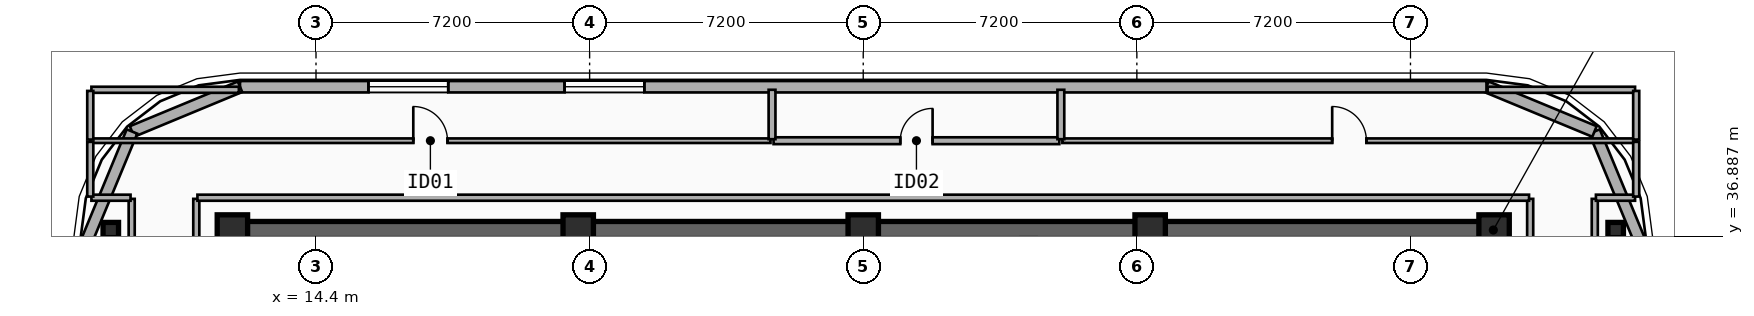
"""IFC4 building model, lengths in metres.
Left out: names, types, materials, properties, quantities, classifications, styles, units other than length and angle.
Written with IfcOpenShell. Run it as: python <this file> out.ifc"""

import sys

from ifc_helpers import new_model, si_unit, direction, frame, frame_2d, origin, origin_2d, place, context, subcontext, project, spatial, rectangle, i_section, extrude, element, fill, save


model = new_model("IFC4")
c1 = context("Model", 3, precision=1e-05, world=origin(), true_north=direction((0.0, 1.0)))
c2 = subcontext(c1, "Body", "Model", "MODEL_VIEW")
j1 = project(units=[si_unit("LENGTHUNIT", "METRE"), si_unit("PLANEANGLEUNIT", "RADIAN")], contexts=[c1])
p1 = place(None, origin())
s1 = spatial("IfcSite", under=j1, at=p1, CompositionType="ELEMENT")
p2 = place(p1, origin())
s2 = spatial("IfcBuilding", under=s1, at=p2, CompositionType="ELEMENT")
p3 = place(p2, frame((0.0, 0.0, 243.6)))
s3 = spatial("IfcBuildingStorey", under=s2, at=p3, CompositionType="ELEMENT", Elevation=243.6)
p4 = place(p3, frame((12.15, 37.05, 0.0), z_axis=(0.0, 0.0, 1.0), x_axis=(1.0, 0.0, 0.0)))
e1 = element("IfcWall", 1, at=p4, inside=s3, PredefinedType="SHEAR", context=c2, shape_type="SweptSolid", body=[
    extrude(rectangle(XDim=33.23, YDim=0.45, at=frame_2d((16.615, 0.0))), origin(), (0.0, 0.0, 1.0), 3.7),
])
for number, where, z_axis, x_axis in (
    (2, (12.2, 37.05, 0.0), (0.0, 0.0, 1.0), (1.0, 0.0, 0.0)),
    (3, (21.3, 37.05, 0.0), (0.0, 0.0, 1.0), (1.0, 0.0, 0.0)),
    (4, (28.8, 37.05, 0.0), (0.0, 0.0, 1.0), (1.0, 0.0, 0.0)),
    (5, (36.35, 37.05, 0.0), (0.0, 0.0, 1.0), (1.0, 0.0, 0.0)),
    (6, (45.4, 37.05, 0.0), (0.0, 0.0, 1.0), (1.0, 0.0, 0.0)),
):
    element("IfcColumn", number, at=place(p3, frame(where, z_axis=z_axis, x_axis=x_axis)), inside=s3, PredefinedType="COLUMN", context=c2, shape_type="SweptSolid", body=[
        extrude(rectangle(XDim=0.8, YDim=0.8, at=origin_2d()), origin(), (0.0, 0.0, 1.0), 3.7),
    ])
for number, where, z_axis, x_axis in (
    (7, (9.0, 37.05, 0.0), (0.0, 0.0, 1.0), (1.0, 0.0, 0.0)),
    (8, (48.6, 37.05, 0.0), (0.0, 0.0, 1.0), (1.0, 0.0, 0.0)),
):
    element("IfcColumn", number, at=place(p3, frame(where, z_axis=z_axis, x_axis=x_axis)), inside=s3, PredefinedType="COLUMN", context=c2, shape_type="SweptSolid", body=[
        extrude(i_section(OverallWidth=0.408, OverallDepth=0.4, WebThickness=0.025, FlangeThickness=0.039, FilletRadius=0.015, at=origin_2d()), origin(), (0.0, 0.0, 1.0), 3.7),
    ])
for number, where, z_axis, x_axis in (
    (9, (48.042, 39.643, 0.0), (0.0, 0.0, 1.0), (0.383, -0.924, 0.0)),
    (10, (45.2, 40.82, 0.0), (0.0, 0.0, 1.0), (0.924, -0.383, 0.0)),
):
    element("IfcWall", number, at=place(p3, frame(where, z_axis=z_axis, x_axis=x_axis)), inside=s3, PredefinedType="SOLIDWALL", context=c2, shape_type="SweptSolid", body=[
        extrude(rectangle(XDim=3.077, YDim=0.3, at=frame_2d((1.538, 0.0))), origin(), (0.0, 0.0, 1.0), 3.42),
    ])
p5 = place(p3, frame((12.4, 40.82, 0.0), z_axis=(0.0, 0.0, 1.0), x_axis=(1.0, 0.0, 0.0)))
e11 = element("IfcWall", 11, at=p5, inside=s3, PredefinedType="SOLIDWALL", context=c2, shape_type="SweptSolid", body=[
    extrude(rectangle(XDim=32.8, YDim=0.3, at=frame_2d((16.4, 0.0))), origin(), (0.0, 0.0, 1.0), 3.42),
])
p6 = place(p5, frame((3.38, 0.0, 0.75)))
e12 = element("IfcOpeningElement", 12, at=p6, cuts=e11, PredefinedType="OPENING", context=c2, shape_type="SweptSolid", body=[
    extrude(rectangle(XDim=2.1, YDim=2.1, at=frame_2d((1.05, 1.05))), frame((0.0, 0.16, 0.0), z_axis=(0.0, -1.0, 0.0), x_axis=(1.0, 0.0, 0.0)), (0.0, 0.0, 1.0), 0.32),
])
p7 = place(p5, frame((8.54, 0.0, 0.75)))
e13 = element("IfcOpeningElement", 13, at=p7, cuts=e11, PredefinedType="OPENING", context=c2, shape_type="SweptSolid", body=[
    extrude(rectangle(XDim=2.1, YDim=2.1, at=frame_2d((1.05, 1.05))), frame((0.0, 0.16, 0.0), z_axis=(0.0, -1.0, 0.0), x_axis=(1.0, 0.0, 0.0)), (0.0, 0.0, 1.0), 0.32),
])
for number, where, z_axis, x_axis in (
    (14, (9.557, 39.643, 0.0), (0.0, 0.0, 1.0), (0.924, 0.383, 0.0)),
    (15, (8.38, 36.8, 0.0), (0.0, 0.0, 1.0), (0.383, 0.924, 0.0)),
):
    element("IfcWall", number, at=place(p3, frame(where, z_axis=z_axis, x_axis=x_axis)), inside=s3, PredefinedType="SOLIDWALL", context=c2, shape_type="SweptSolid", body=[
        extrude(rectangle(XDim=3.077, YDim=0.3, at=frame_2d((1.538, 0.0))), origin(), (0.0, 0.0, 1.0), 3.42),
    ])
p8 = place(p3, frame((8.46, 39.4, 0.0), z_axis=(0.0, 0.0, 1.0), x_axis=(1.0, 0.0, 0.0)))
e16 = element("IfcWall", 16, at=p8, inside=s3, PredefinedType="PARTITIONING", context=c2, shape_type="SweptSolid", body=[
    extrude(rectangle(XDim=17.9, YDim=0.12, at=frame_2d((8.95, 0.0))), origin(), (0.0, 0.0, 1.0), 3.42),
])
p9 = place(p8, frame((8.5, 0.0, 0.0)))
e17 = element("IfcOpeningElement", 17, at=p9, cuts=e16, PredefinedType="OPENING", context=c2, shape_type="SweptSolid", body=[
    extrude(rectangle(XDim=0.9, YDim=2.1, at=frame_2d((0.45, 1.05))), frame((0.0, 0.07, 0.0), z_axis=(0.0, -1.0, 0.0), x_axis=(1.0, 0.0, 0.0)), (0.0, 0.0, 1.0), 0.14),
])
p10 = place(p3, frame((26.44, 39.4, 0.0), z_axis=(0.0, 0.0, 1.0), x_axis=(1.0, 0.0, 0.0)))
e18 = element("IfcWall", 18, at=p10, inside=s3, PredefinedType="PLUMBINGWALL", context=c2, shape_type="SweptSolid", body=[
    extrude(rectangle(XDim=7.52, YDim=0.18, at=frame_2d((3.76, 0.0))), origin(), (0.0, 0.0, 1.0), 3.42),
])
p11 = place(p10, frame((3.335, 0.0, 0.0)))
e19 = element("IfcOpeningElement", 19, at=p11, cuts=e18, PredefinedType="OPENING", context=c2, shape_type="SweptSolid", body=[
    extrude(rectangle(XDim=0.85, YDim=2.1, at=frame_2d((0.425, 1.05))), frame((0.0, 0.1, 0.0), z_axis=(0.0, -1.0, 0.0), x_axis=(1.0, 0.0, 0.0)), (0.0, 0.0, 1.0), 0.2),
])
p12 = place(p3, frame((34.04, 39.4, 0.0), z_axis=(0.0, 0.0, 1.0), x_axis=(1.0, 0.0, 0.0)))
e20 = element("IfcWall", 20, at=p12, inside=s3, PredefinedType="PARTITIONING", context=c2, shape_type="SweptSolid", body=[
    extrude(rectangle(XDim=15.1, YDim=0.12, at=frame_2d((7.55, 0.0))), origin(), (0.0, 0.0, 1.0), 3.42),
])
p13 = place(p12, frame((7.1, 0.0, 0.0)))
e21 = element("IfcOpeningElement", 21, at=p13, cuts=e20, PredefinedType="OPENING", context=c2, shape_type="SweptSolid", body=[
    extrude(rectangle(XDim=0.9, YDim=2.1, at=frame_2d((0.45, 1.05))), frame((0.0, 0.07, 0.0), z_axis=(0.0, -1.0, 0.0), x_axis=(1.0, 0.0, 0.0)), (0.0, 0.0, 1.0), 0.14),
])
for number, where, z_axis, x_axis in (
    (22, (26.4, 39.44, 0.0), (0.0, 0.0, 1.0), (0.0, 1.0, 0.0)),
    (23, (34.0, 39.44, 0.0), (0.0, 0.0, 1.0), (0.0, 1.0, 0.0)),
):
    element("IfcWall", number, at=place(p3, frame(where, z_axis=z_axis, x_axis=x_axis)), inside=s3, PredefinedType="PLUMBINGWALL", context=c2, shape_type="SweptSolid", body=[
        extrude(rectangle(XDim=1.3, YDim=0.18, at=frame_2d((0.65, 0.0))), origin(), (0.0, 0.0, 1.0), 3.42),
    ])
for number, where, z_axis, x_axis in (
    (24, (9.55, 27.63, 0.0), (0.0, 0.0, 1.0), (0.0, 1.0, 0.0)),
    (25, (11.25, 27.63, 0.0), (0.0, 0.0, 1.0), (0.0, 1.0, 0.0)),
    (26, (46.35, 27.63, 0.0), (0.0, 0.0, 1.0), (0.0, 1.0, 0.0)),
    (27, (48.05, 27.63, 0.0), (0.0, 0.0, 1.0), (0.0, 1.0, 0.0)),
):
    element("IfcWall", number, at=place(p3, frame(where, z_axis=z_axis, x_axis=x_axis)), inside=s3, PredefinedType="PARTITIONING", context=c2, shape_type="SweptSolid", body=[
        extrude(rectangle(XDim=10.24, YDim=0.16, at=frame_2d((5.12, 0.0))), origin(), (0.0, 0.0, 1.0), 2.9),
    ])
p14 = place(p3, frame((8.49, 37.9, 0.0), z_axis=(0.0, 0.0, 1.0), x_axis=(1.0, 0.0, 0.0)))
e28 = element("IfcWall", 28, at=p14, inside=s3, PredefinedType="PARTITIONING", context=c2, shape_type="SweptSolid", body=[
    extrude(rectangle(XDim=1.03, YDim=0.16, at=frame_2d((0.515, 0.0))), origin(), (0.0, 0.0, 1.0), 3.42),
])
p15 = place(p3, frame((11.28, 37.9, 0.0), z_axis=(0.0, 0.0, 1.0), x_axis=(1.0, 0.0, 0.0)))
e29 = element("IfcWall", 29, at=p15, inside=s3, PredefinedType="PARTITIONING", context=c2, shape_type="SweptSolid", body=[
    extrude(rectangle(XDim=35.04, YDim=0.16, at=frame_2d((17.52, 0.0))), origin(), (0.0, 0.0, 1.0), 3.42),
])
p16 = place(p3, frame((48.08, 37.9, 0.0), z_axis=(0.0, 0.0, 1.0), x_axis=(1.0, 0.0, 0.0)))
e30 = element("IfcWall", 30, at=p16, inside=s3, PredefinedType="PARTITIONING", context=c2, shape_type="SweptSolid", body=[
    extrude(rectangle(XDim=1.03, YDim=0.16, at=frame_2d((0.515, 0.0))), origin(), (0.0, 0.0, 1.0), 3.42),
])
for number, where, z_axis, x_axis in (
    (31, (8.46, 37.93, 0.0), (0.0, 0.0, 1.0), (0.0, 1.0, 0.0)),
    (32, (49.14, 37.93, 0.0), (0.0, 0.0, 1.0), (0.0, 1.0, 0.0)),
):
    element("IfcWall", number, at=place(p3, frame(where, z_axis=z_axis, x_axis=x_axis)), inside=s3, PredefinedType="PARTITIONING", context=c2, shape_type="SweptSolid", body=[
        extrude(rectangle(XDim=1.44, YDim=0.16, at=frame_2d((0.72, 0.0))), origin(), (0.0, 0.0, 1.0), 3.42),
    ])
p17 = place(p3, frame((8.49, 40.74, 0.0), z_axis=(0.0, 0.0, 1.0), x_axis=(1.0, 0.0, 0.0)))
e33 = element("IfcWall", 33, at=p17, inside=s3, PredefinedType="PARTITIONING", context=c2, shape_type="SweptSolid", body=[
    extrude(rectangle(XDim=3.88, YDim=0.16, at=frame_2d((1.94, 0.0))), origin(), (0.0, 0.0, 1.0), 3.42),
])
p18 = place(p3, frame((8.46, 39.43, 0.0), z_axis=(0.0, 0.0, 1.0), x_axis=(0.0, 1.0, 0.0)))
e34 = element("IfcWall", 34, at=p18, inside=s3, PredefinedType="PARTITIONING", context=c2, shape_type="SweptSolid", body=[
    extrude(rectangle(XDim=1.28, YDim=0.16, at=frame_2d((0.64, 0.0))), origin(), (0.0, 0.0, 1.0), 3.42),
])
p19 = place(p3, frame((45.23, 40.74, 0.0), z_axis=(0.0, 0.0, 1.0), x_axis=(1.0, 0.0, 0.0)))
e35 = element("IfcWall", 35, at=p19, inside=s3, PredefinedType="PARTITIONING", context=c2, shape_type="SweptSolid", body=[
    extrude(rectangle(XDim=3.88, YDim=0.16, at=frame_2d((1.94, 0.0))), origin(), (0.0, 0.0, 1.0), 3.42),
])
p20 = place(p3, frame((49.14, 39.43, 0.0), z_axis=(0.0, 0.0, 1.0), x_axis=(0.0, 1.0, 0.0)))
e36 = element("IfcWall", 36, at=p20, inside=s3, PredefinedType="PARTITIONING", context=c2, shape_type="SweptSolid", body=[
    extrude(rectangle(XDim=1.28, YDim=0.16, at=frame_2d((0.64, 0.0))), origin(), (0.0, 0.0, 1.0), 3.42),
])
p21 = place(p6, origin())
e37 = element("IfcWindow", 37, at=p21, inside=s3, PartitioningType="SINGLE_PANEL", PredefinedType="WINDOW", context=c2, shape_type="SweptSolid", body=[
    extrude(rectangle(XDim=2.1, YDim=2.1, at=frame_2d((1.05, 1.05))), frame((0.0, 0.03, 0.0), z_axis=(0.0, -1.0, 0.0), x_axis=(1.0, 0.0, 0.0)), (0.0, 0.0, 1.0), 0.06),
])
fill(e12, e37)
p22 = place(p7, origin())
e38 = element("IfcWindow", 38, at=p22, inside=s3, PartitioningType="SINGLE_PANEL", PredefinedType="WINDOW", context=c2, shape_type="SweptSolid", body=[
    extrude(rectangle(XDim=2.1, YDim=2.1, at=frame_2d((1.05, 1.05))), frame((0.0, 0.03, 0.0), z_axis=(0.0, -1.0, 0.0), x_axis=(1.0, 0.0, 0.0)), (0.0, 0.0, 1.0), 0.06),
])
fill(e13, e38)
p23 = place(p9, origin())
e39 = element("IfcDoor", 39, at=p23, inside=s3, OperationType="SINGLE_SWING_LEFT", PredefinedType="DOOR", context=c2, shape_type="SweptSolid", body=[
    extrude(rectangle(XDim=0.9, YDim=2.1, at=frame_2d((0.45, 1.05))), frame((0.0, 0.025, 0.0), z_axis=(0.0, -1.0, 0.0), x_axis=(1.0, 0.0, 0.0)), (0.0, 0.0, 1.0), 0.05),
])
fill(e17, e39)
p24 = place(p11, origin())
e40 = element("IfcDoor", 40, at=p24, inside=s3, OperationType="SINGLE_SWING_RIGHT", PredefinedType="DOOR", context=c2, shape_type="SweptSolid", body=[
    extrude(rectangle(XDim=0.85, YDim=2.1, at=frame_2d((0.425, 1.05))), frame((0.0, 0.025, 0.0), z_axis=(0.0, -1.0, 0.0), x_axis=(1.0, 0.0, 0.0)), (0.0, 0.0, 1.0), 0.05),
])
fill(e19, e40)
p25 = place(p13, origin())
e41 = element("IfcDoor", 41, at=p25, inside=s3, OperationType="SINGLE_SWING_LEFT", PredefinedType="DOOR", context=c2, shape_type="SweptSolid", body=[
    extrude(rectangle(XDim=0.9, YDim=2.1, at=frame_2d((0.45, 1.05))), frame((0.0, 0.025, 0.0), z_axis=(0.0, -1.0, 0.0), x_axis=(1.0, 0.0, 0.0)), (0.0, 0.0, 1.0), 0.05),
])
fill(e21, e41)
save(model, sys.argv[1])
